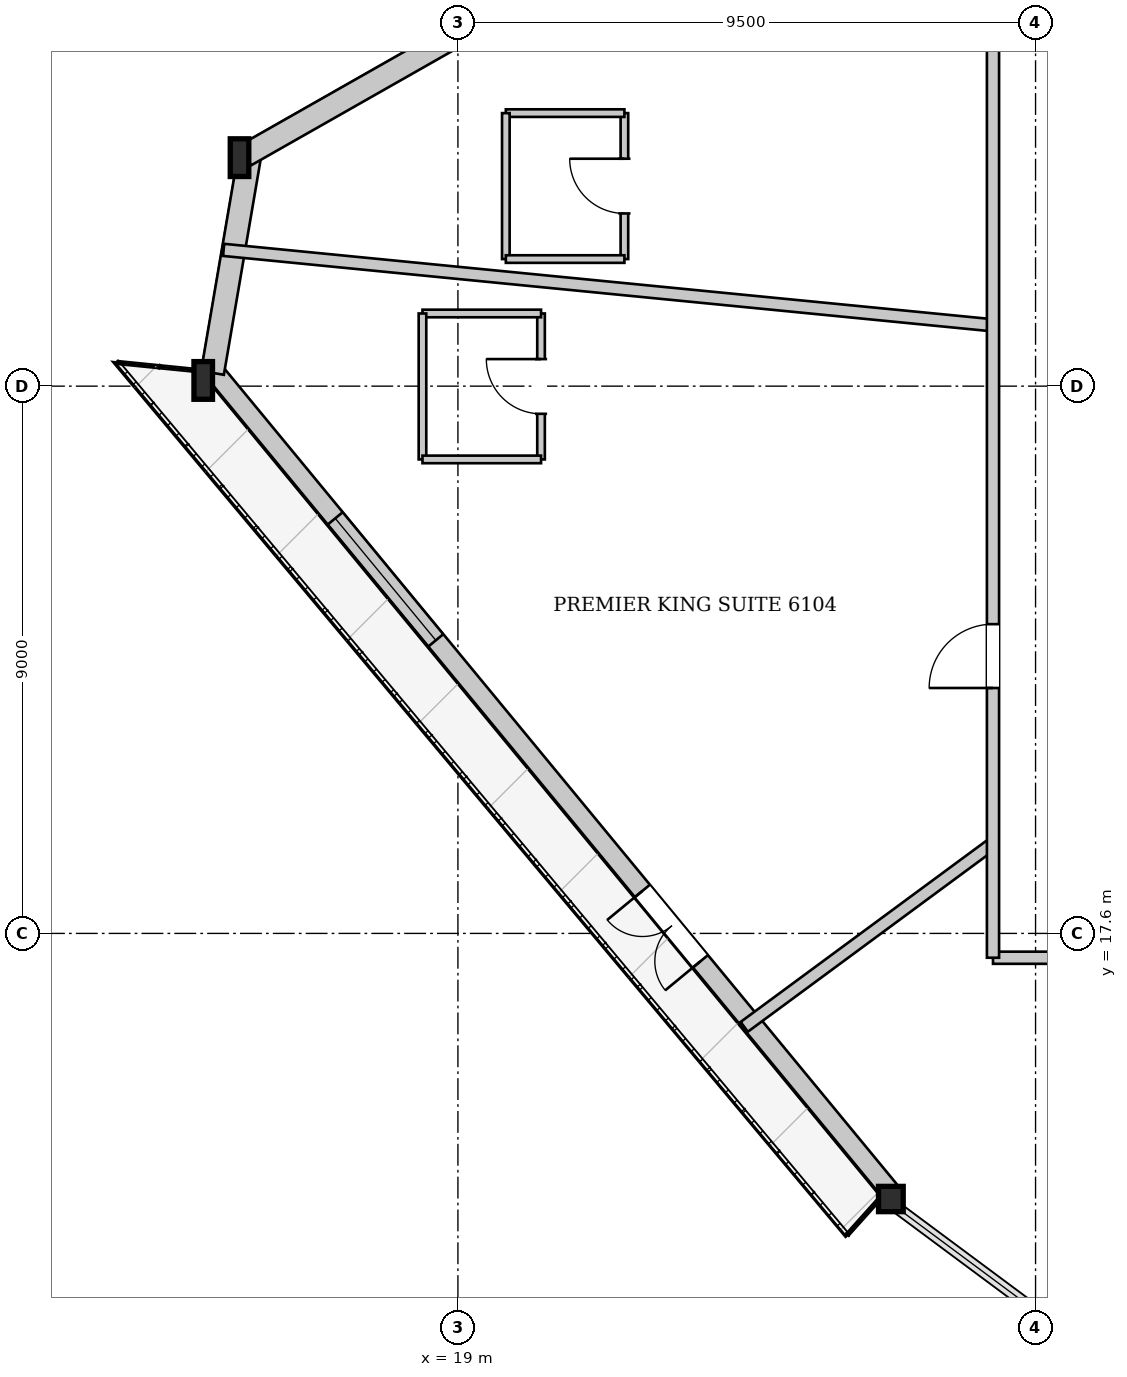
"""IFC4 building model, lengths in metres.
Left out: names, types, materials, properties, quantities, classifications, styles, units other than length and angle.
Written with IfcOpenShell. Run it as: python <this file> out.ifc"""

import sys

from ifc_helpers import new_model, si_unit, direction, frame, frame_2d, origin, origin_2d, place, context, subcontext, project, spatial, rectangle, i_section, extrude, source, transform, mapped, element, fill, save


model = new_model("IFC4")
c1 = context("Model", 3, precision=1e-05, world=origin(), true_north=direction((0.0, 1.0)))
c2 = subcontext(c1, "Body", "Model", "MODEL_VIEW")
j1 = project(units=[si_unit("LENGTHUNIT", "METRE"), si_unit("PLANEANGLEUNIT", "RADIAN")], contexts=[c1])
p1 = place(None, origin())
s1 = spatial("IfcSite", under=j1, at=p1, CompositionType="ELEMENT")
p2 = place(p1, origin())
s2 = spatial("IfcBuilding", under=s1, at=p2, CompositionType="ELEMENT")
p3 = place(p2, frame((0.0, 0.0, 230.9)))
s3 = spatial("IfcBuildingStorey", under=s2, at=p3, CompositionType="ELEMENT", Elevation=230.9)
m1 = source(origin(), c2, "Body", "SweptSolid", [
    extrude(i_section(OverallWidth=0.305, OverallDepth=0.62, WebThickness=0.021, FlangeThickness=0.04, at=origin_2d()), origin(), (0.0, 0.0, 1.0), 3.459),
])
p4 = place(p3, frame((15.41, 30.561, 0.0), z_axis=(-0.001199851642, -0.117656040432, 0.99305368259), x_axis=(0.999948004857, -0.010197430164, 0.0)))
e1 = element("IfcColumn", 1, at=p4, inside=s3, PredefinedType="COLUMN", context=c2, shape_type="MappedRepresentation", body=[
    mapped(m1, transform((0.0, 0.0, 0.0), x_axis=(1.0, 0.0, 0.0), y_axis=(0.0, 1.0, 0.0), z_axis=(0.0, 0.0, 1.0), scale=1.0)),
])
m2 = source(origin(), c2, "Body", "SweptSolid", [
    extrude(i_section(OverallWidth=0.305, OverallDepth=0.62, WebThickness=0.021, FlangeThickness=0.04, at=origin_2d()), origin(), (0.0, 0.0, 1.0), 3.45),
])
p5 = place(p3, frame((14.776, 26.85, 0.0), z_axis=(0.020451142237, -0.090720983904, 0.995666336611), x_axis=(0.975520046372, 0.219910525274, 0.0)))
e2 = element("IfcColumn", 2, at=p5, inside=s3, PredefinedType="COLUMN", context=c2, shape_type="MappedRepresentation", body=[
    mapped(m2, transform((0.0, 0.0, 0.0), x_axis=(1.0, 0.0, 0.0), y_axis=(0.0, 1.0, 0.0), z_axis=(0.0, 0.0, 1.0), scale=1.0)),
])
m3 = source(origin(), c2, "Body", "SweptSolid", [
    extrude(i_section(OverallWidth=0.406, OverallDepth=0.416, WebThickness=0.027, FlangeThickness=0.042, at=origin_2d()), origin(), (0.0, 0.0, 1.0), 3.449),
])
p6 = place(p3, frame((25.969, 13.275, 0.0), z_axis=(0.087482925626, -0.024631114982, 0.995861459189), x_axis=(0.271016201839, 0.962574785843, 0.0)))
e3 = element("IfcColumn", 3, at=p6, inside=s3, PredefinedType="COLUMN", context=c2, shape_type="MappedRepresentation", body=[
    mapped(m3, transform((0.0, 0.0, 0.0), x_axis=(1.0, 0.0, 0.0), y_axis=(0.0, 1.0, 0.0), z_axis=(0.0, 0.0, 1.0), scale=1.0)),
])
p7 = place(p3, frame((26.093, 13.376, 0.0), z_axis=(0.0, 0.0, 1.0), x_axis=(-0.636168686104, 0.771550000208, 0.0)))
e4 = element("IfcWall", 4, at=p7, inside=s3, PredefinedType="SOLIDWALL", context=c2, shape_type="SweptSolid", body=[
    extrude(rectangle(XDim=17.595, YDim=0.32, at=frame_2d((8.798, 0.0))), origin(), (0.0, 0.0, 1.0), 2.872),
])
p8 = place(p7, frame((4.88, 0.0, 0.0)))
e5 = element("IfcOpeningElement", 5, at=p8, cuts=e4, PredefinedType="OPENING", context=c2, shape_type="SweptSolid", body=[
    extrude(rectangle(XDim=1.5, YDim=2.3, at=frame_2d((0.75, 1.15))), frame((0.0, 0.17, 0.0), z_axis=(0.0, -1.0, 0.0), x_axis=(1.0, 0.0, 0.0)), (0.0, 0.0, 1.0), 0.34),
])
p9 = place(p7, frame((11.721, 0.0, 0.402)))
e6 = element("IfcOpeningElement", 6, at=p9, cuts=e4, PredefinedType="OPENING", context=c2, shape_type="SweptSolid", body=[
    extrude(rectangle(XDim=2.6, YDim=2.35, at=frame_2d((1.3, 1.175))), frame((0.0, 0.17, 0.0), z_axis=(0.0, -1.0, 0.0), x_axis=(1.0, 0.0, 0.0)), (0.0, 0.0, 1.0), 0.34),
])
p10 = place(p3, frame((14.963, 26.818, 0.0), z_axis=(0.0, 0.0, 1.0), x_axis=(0.168425569437, 0.985714374228, 0.0)))
e7 = element("IfcWall", 7, at=p10, inside=s3, PredefinedType="SOLIDWALL", context=c2, shape_type="SweptSolid", body=[
    extrude(rectangle(XDim=3.764, YDim=0.38, at=frame_2d((1.882, 0.0))), origin(), (0.0, 0.0, 1.0), 2.872),
])
p11 = place(p3, frame((15.504, 30.396, 0.0), z_axis=(0.0, 0.0, 1.0), x_axis=(0.869398698509, 0.494111225365, 0.0)))
e8 = element("IfcWall", 8, at=p11, inside=s3, PredefinedType="SOLIDWALL", context=c2, shape_type="SweptSolid", body=[
    extrude(rectangle(XDim=22.369, YDim=0.38, at=frame_2d((11.185, 0.0))), origin(), (0.0, 0.0, 1.0), 2.872),
])
p12 = place(p11, frame((5.163, 0.0, 0.502)))
e9 = element("IfcOpeningElement", 9, at=p12, cuts=e8, PredefinedType="OPENING", context=c2, shape_type="SweptSolid", body=[
    extrude(rectangle(XDim=2.2, YDim=2.25, at=frame_2d((1.1, 1.125))), frame((0.0, 0.2, 0.0), z_axis=(0.0, -1.0, 0.0), x_axis=(1.0, 0.0, 0.0)), (0.0, 0.0, 1.0), 0.4),
])
p13 = place(p11, frame((15.206, 0.0, 0.502)))
e10 = element("IfcOpeningElement", 10, at=p13, cuts=e8, PredefinedType="OPENING", context=c2, shape_type="SweptSolid", body=[
    extrude(rectangle(XDim=2.2, YDim=2.25, at=frame_2d((1.1, 1.125))), frame((0.0, 0.2, 0.0), z_axis=(0.0, -1.0, 0.0), x_axis=(1.0, 0.0, 0.0)), (0.0, 0.0, 1.0), 0.4),
])
p14 = place(p3, frame((27.8, 27.6, 0.0), z_axis=(0.0, 0.0, 1.0), x_axis=(-0.995227172247, 0.097585222353, 0.0)))
e11 = element("IfcWall", 11, at=p14, inside=s3, PredefinedType="PARTITIONING", context=c2, shape_type="SweptSolid", body=[
    extrude(rectangle(XDim=12.714, YDim=0.2, at=frame_2d((6.357, 0.0))), origin(), (0.0, 0.0, 1.0), 3.38),
])
p15 = place(p3, frame((27.8, 19.08, 0.0), z_axis=(0.0, 0.0, 1.0), x_axis=(-0.804918187544, -0.593385803134, 0.0)))
e12 = element("IfcWall", 12, at=p15, inside=s3, PredefinedType="PARTITIONING", context=c2, shape_type="SweptSolid", body=[
    extrude(rectangle(XDim=5.083, YDim=0.2, at=frame_2d((2.542, 0.0))), origin(), (0.0, 0.0, 1.0), 3.38),
])
p16 = place(p3, frame((21.738, 28.69, 0.0), z_axis=(0.0, 0.0, 1.0), x_axis=(0.0, 1.0, 0.0)))
e13 = element("IfcWall", 13, at=p16, inside=s3, PredefinedType="PARTITIONING", context=c2, shape_type="SweptSolid", body=[
    extrude(rectangle(XDim=2.4, YDim=0.125, at=frame_2d((1.2, 0.0))), origin(), (0.0, 0.0, 1.0), 3.38),
])
p17 = place(p16, frame((0.75, 0.0, 0.0)))
e14 = element("IfcOpeningElement", 14, at=p17, cuts=e13, PredefinedType="OPENING", context=c2, shape_type="SweptSolid", body=[
    extrude(rectangle(XDim=0.9, YDim=2.1, at=frame_2d((0.45, 1.05))), frame((0.0, 0.073, 0.0), z_axis=(0.0, -1.0, 0.0), x_axis=(1.0, 0.0, 0.0)), (0.0, 0.0, 1.0), 0.145),
])
p18 = place(p3, frame((21.738, 31.09, 0.0), z_axis=(0.0, 0.0, 1.0), x_axis=(-1.0, 0.0, 0.0)))
e15 = element("IfcWall", 15, at=p18, inside=s3, PredefinedType="PARTITIONING", context=c2, shape_type="SweptSolid", body=[
    extrude(rectangle(XDim=1.95, YDim=0.125, at=frame_2d((0.975, 0.0))), origin(), (0.0, 0.0, 1.0), 3.38),
])
p19 = place(p3, frame((19.788, 31.09, 0.0), z_axis=(0.0, 0.0, 1.0), x_axis=(0.0, -1.0, 0.0)))
e16 = element("IfcWall", 16, at=p19, inside=s3, PredefinedType="PARTITIONING", context=c2, shape_type="SweptSolid", body=[
    extrude(rectangle(XDim=2.4, YDim=0.125, at=frame_2d((1.2, 0.0))), origin(), (0.0, 0.0, 1.0), 3.38),
])
p20 = place(p3, frame((19.788, 28.69, 0.0), z_axis=(0.0, 0.0, 1.0), x_axis=(1.0, 0.0, 0.0)))
e17 = element("IfcWall", 17, at=p20, inside=s3, PredefinedType="PARTITIONING", context=c2, shape_type="SweptSolid", body=[
    extrude(rectangle(XDim=1.95, YDim=0.125, at=frame_2d((0.975, 0.0))), origin(), (0.0, 0.0, 1.0), 3.38),
])
p21 = place(p3, frame((20.367, 25.395, 0.0), z_axis=(0.0, 0.0, 1.0), x_axis=(0.0, 1.0, 0.0)))
e18 = element("IfcWall", 18, at=p21, inside=s3, PredefinedType="PARTITIONING", context=c2, shape_type="SweptSolid", body=[
    extrude(rectangle(XDim=2.4, YDim=0.125, at=frame_2d((1.2, 0.0))), origin(), (0.0, 0.0, 1.0), 3.38),
])
p22 = place(p21, frame((0.75, 0.0, 0.0)))
e19 = element("IfcOpeningElement", 19, at=p22, cuts=e18, PredefinedType="OPENING", context=c2, shape_type="SweptSolid", body=[
    extrude(rectangle(XDim=0.9, YDim=2.1, at=frame_2d((0.45, 1.05))), frame((0.0, 0.073, 0.0), z_axis=(0.0, -1.0, 0.0), x_axis=(1.0, 0.0, 0.0)), (0.0, 0.0, 1.0), 0.145),
])
p23 = place(p3, frame((20.367, 27.795, 0.0), z_axis=(0.0, 0.0, 1.0), x_axis=(-1.0, 0.0, 0.0)))
e20 = element("IfcWall", 20, at=p23, inside=s3, PredefinedType="PARTITIONING", context=c2, shape_type="SweptSolid", body=[
    extrude(rectangle(XDim=1.95, YDim=0.125, at=frame_2d((0.975, 0.0))), origin(), (0.0, 0.0, 1.0), 3.38),
])
p24 = place(p3, frame((18.417, 27.795, 0.0), z_axis=(0.0, 0.0, 1.0), x_axis=(0.0, -1.0, 0.0)))
e21 = element("IfcWall", 21, at=p24, inside=s3, PredefinedType="PARTITIONING", context=c2, shape_type="SweptSolid", body=[
    extrude(rectangle(XDim=2.4, YDim=0.125, at=frame_2d((1.2, 0.0))), origin(), (0.0, 0.0, 1.0), 3.38),
])
p25 = place(p3, frame((18.417, 25.395, 0.0), z_axis=(0.0, 0.0, 1.0), x_axis=(1.0, 0.0, 0.0)))
e22 = element("IfcWall", 22, at=p25, inside=s3, PredefinedType="PARTITIONING", context=c2, shape_type="SweptSolid", body=[
    extrude(rectangle(XDim=1.95, YDim=0.125, at=frame_2d((0.975, 0.0))), origin(), (0.0, 0.0, 1.0), 3.38),
])
p26 = place(p3, frame((27.8, 17.2, 0.0), z_axis=(0.0, 0.0, 1.0), x_axis=(1.0, 0.0, 0.0)))
e23 = element("IfcWall", 23, at=p26, inside=s3, PredefinedType="PARTITIONING", context=c2, shape_type="SweptSolid", body=[
    extrude(rectangle(XDim=20.4, YDim=0.2, at=frame_2d((10.2, 0.0))), origin(), (0.0, 0.0, 1.0), 3.38),
])
p27 = place(p26, frame((7.336, 0.0, 0.0)))
e24 = element("IfcOpeningElement", 24, at=p27, cuts=e23, PredefinedType="OPENING", context=c2, shape_type="SweptSolid", body=[
    extrude(rectangle(XDim=1.05, YDim=2.2, at=frame_2d((0.525, 1.1))), frame((0.0, 0.11, 0.0), z_axis=(0.0, -1.0, 0.0), x_axis=(1.0, 0.0, 0.0)), (0.0, 0.0, 1.0), 0.22),
])
p28 = place(p26, frame((14.156, 0.0, 0.0)))
e25 = element("IfcOpeningElement", 25, at=p28, cuts=e23, PredefinedType="OPENING", context=c2, shape_type="SweptSolid", body=[
    extrude(rectangle(XDim=1.05, YDim=2.2, at=frame_2d((0.525, 1.1))), frame((0.0, 0.11, 0.0), z_axis=(0.0, -1.0, 0.0), x_axis=(1.0, 0.0, 0.0)), (0.0, 0.0, 1.0), 0.22),
])
p29 = place(p3, frame((27.8, 17.2, 0.0), z_axis=(0.0, 0.0, 1.0), x_axis=(0.0, 1.0, 0.0)))
e26 = element("IfcWall", 26, at=p29, inside=s3, PredefinedType="PARTITIONING", context=c2, shape_type="SweptSolid", body=[
    extrude(rectangle(XDim=18.8, YDim=0.2, at=frame_2d((9.4, 0.0))), origin(), (0.0, 0.0, 1.0), 3.38),
])
p30 = place(p29, frame((15.86, 0.0, 0.0)))
e27 = element("IfcOpeningElement", 27, at=p30, cuts=e26, PredefinedType="OPENING", context=c2, shape_type="SweptSolid", body=[
    extrude(rectangle(XDim=1.05, YDim=2.2, at=frame_2d((0.525, 1.1))), frame((0.0, 0.11, 0.0), z_axis=(0.0, -1.0, 0.0), x_axis=(1.0, 0.0, 0.0)), (0.0, 0.0, 1.0), 0.22),
])
p31 = place(p29, frame((4.436, 0.0, 0.0)))
e28 = element("IfcOpeningElement", 28, at=p31, cuts=e26, PredefinedType="OPENING", context=c2, shape_type="SweptSolid", body=[
    extrude(rectangle(XDim=1.05, YDim=2.2, at=frame_2d((0.525, 1.1))), frame((0.0, 0.11, 0.0), z_axis=(0.0, -1.0, 0.0), x_axis=(1.0, 0.0, 0.0)), (0.0, 0.0, 1.0), 0.22),
])
m4 = source(origin(), c2, "Body", "SweptSolid", [
    extrude(rectangle(XDim=1.5, YDim=2.3, at=frame_2d((0.75, 1.15))), frame((0.0, 0.025, 0.0), z_axis=(0.0, -1.0, 0.0), x_axis=(1.0, 0.0, 0.0)), (0.0, 0.0, 1.0), 0.05),
])
p32 = place(p8, origin())
e29 = element("IfcDoor", 29, at=p32, inside=s3, OperationType="DOUBLE_DOOR_SINGLE_SWING", PredefinedType="DOOR", context=c2, shape_type="MappedRepresentation", body=[
    mapped(m4, transform((0.0, 0.0, 0.0), x_axis=(1.0, 0.0, 0.0), y_axis=(0.0, 1.0, 0.0), z_axis=(0.0, 0.0, 1.0), scale=1.0)),
])
fill(e5, e29)
m5 = source(origin(), c2, "Body", "SweptSolid", [
    extrude(rectangle(XDim=2.6, YDim=2.35, at=frame_2d((1.3, 1.175))), frame((0.0, 0.03, 0.0), z_axis=(0.0, -1.0, 0.0), x_axis=(1.0, 0.0, 0.0)), (0.0, 0.0, 1.0), 0.06),
])
p33 = place(p9, origin())
e30 = element("IfcWindow", 30, at=p33, inside=s3, PartitioningType="SINGLE_PANEL", PredefinedType="WINDOW", context=c2, shape_type="MappedRepresentation", body=[
    mapped(m5, transform((0.0, 0.0, 0.0), x_axis=(1.0, 0.0, 0.0), y_axis=(0.0, 1.0, 0.0), z_axis=(0.0, 0.0, 1.0), scale=1.0)),
])
fill(e6, e30)
m6 = source(origin(), c2, "Body", "SweptSolid", [
    extrude(rectangle(XDim=0.9, YDim=2.1, at=frame_2d((0.45, 1.05))), frame((0.0, 0.025, 0.0), z_axis=(0.0, -1.0, 0.0), x_axis=(1.0, 0.0, 0.0)), (0.0, 0.0, 1.0), 0.05),
])
p34 = place(p17, origin())
e31 = element("IfcDoor", 31, at=p34, inside=s3, OperationType="SINGLE_SWING_RIGHT", PredefinedType="DOOR", context=c2, shape_type="MappedRepresentation", body=[
    mapped(m6, transform((0.0, 0.0, 0.0), x_axis=(1.0, 0.0, 0.0), y_axis=(0.0, 1.0, 0.0), z_axis=(0.0, 0.0, 1.0), scale=1.0)),
])
fill(e14, e31)
p35 = place(p22, origin())
e32 = element("IfcDoor", 32, at=p35, inside=s3, OperationType="SINGLE_SWING_RIGHT", PredefinedType="DOOR", context=c2, shape_type="MappedRepresentation", body=[
    mapped(m6, transform((0.0, 0.0, 0.0), x_axis=(1.0, 0.0, 0.0), y_axis=(0.0, 1.0, 0.0), z_axis=(0.0, 0.0, 1.0), scale=1.0)),
])
fill(e19, e32)
m7 = source(origin(), c2, "Body", "SweptSolid", [
    extrude(rectangle(XDim=1.05, YDim=2.2, at=frame_2d((0.525, 1.1))), frame((0.0, 0.025, 0.0), z_axis=(0.0, -1.0, 0.0), x_axis=(1.0, 0.0, 0.0)), (0.0, 0.0, 1.0), 0.05),
])
p36 = place(p31, origin())
e33 = element("IfcDoor", 33, at=p36, inside=s3, OperationType="SINGLE_SWING_LEFT", PredefinedType="DOOR", context=c2, shape_type="MappedRepresentation", body=[
    mapped(m7, transform((0.0, 0.0, 0.0), x_axis=(1.0, 0.0, 0.0), y_axis=(0.0, 1.0, 0.0), z_axis=(0.0, 0.0, 1.0), scale=1.0)),
])
fill(e28, e33)
save(model, sys.argv[1])
